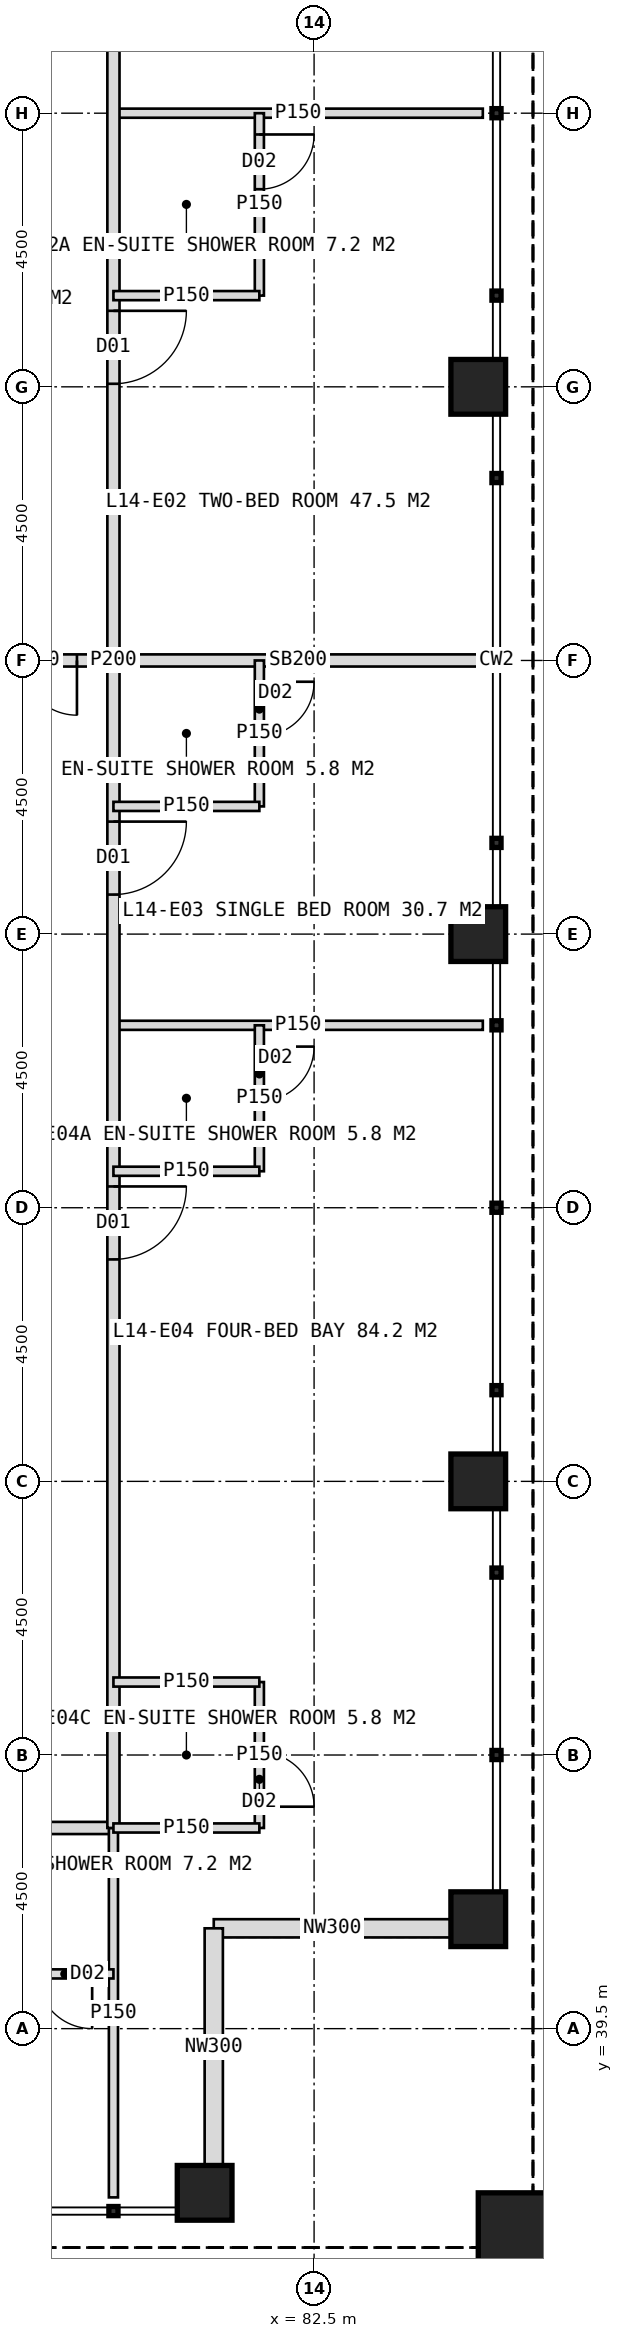
"""IFC4 building model, lengths in metres.
Left out: names, types, materials, properties, quantities, classifications, styles, units other than length and angle.
Written with IfcOpenShell. Run it as: python <this file> out.ifc"""

import sys

from ifc_helpers import new_model, si_unit, direction, frame, frame_2d, origin, origin_2d, place, context, subcontext, project, spatial, rectangle, hollow_rectangle, extrude, element, fill, save


model = new_model("IFC4")
c1 = context("Model", 3, precision=1e-05, world=origin(), true_north=direction((0.0, 1.0)))
c2 = subcontext(c1, "Body", "Model", "MODEL_VIEW")
j1 = project(units=[si_unit("LENGTHUNIT", "METRE"), si_unit("PLANEANGLEUNIT", "RADIAN")], contexts=[c1])
p1 = place(None, origin())
s1 = spatial("IfcSite", under=j1, at=p1, CompositionType="ELEMENT")
p2 = place(p1, origin())
s2 = spatial("IfcBuilding", under=s1, at=p2, CompositionType="ELEMENT")
p3 = place(p2, frame((0.0, 0.0, 63.0)))
s3 = spatial("IfcBuildingStorey", under=s2, at=p3, CompositionType="ELEMENT", Elevation=63.0)
for number, where, z_axis, x_axis in (
    (1, (85.2, 41.3, 0.0), (0.0, 0.0, 1.0), (1.0, 0.0, 0.0)),
    (2, (85.2, 48.5, 0.0), (0.0, 0.0, 1.0), (1.0, 0.0, 0.0)),
    (3, (85.2, 57.5, 0.0), (0.0, 0.0, 1.0), (1.0, 0.0, 0.0)),
    (4, (85.2, 66.5, 0.0), (0.0, 0.0, 1.0), (1.0, 0.0, 0.0)),
    (5, (80.7, 36.8, 0.0), (0.0, 0.0, 1.0), (1.0, 0.0, 0.0)),
):
    element("IfcColumn", number, at=place(p3, frame(where, z_axis=z_axis, x_axis=x_axis)), inside=s3, PredefinedType="COLUMN", context=c2, shape_type="SweptSolid", body=[
        extrude(hollow_rectangle(XDim=0.9, YDim=0.9, WallThickness=0.08, at=origin_2d()), origin(), (0.0, 0.0, 1.0), 4.0),
    ])
p4 = place(p3, frame((86.1, 35.9, 0.0), z_axis=(0.0, 0.0, 1.0), x_axis=(1.0, 0.0, 0.0)))
e6 = element("IfcColumn", 6, at=p4, inside=s3, PredefinedType="COLUMN", context=c2, shape_type="SweptSolid", body=[
    extrude(hollow_rectangle(XDim=1.8, YDim=1.8, WallThickness=0.1, at=origin_2d()), origin(), (0.0, 0.0, 1.0), 4.0),
])
for number, where, z_axis, x_axis in (
    (7, (84.75, 41.15, 0.0), (0.0, 0.0, 1.0), (-1.0, 0.0, 0.0)),
    (8, (80.85, 41.15, 0.0), (0.0, 0.0, 1.0), (0.0, -1.0, 0.0)),
):
    element("IfcWall", number, at=place(p3, frame(where, z_axis=z_axis, x_axis=x_axis)), inside=s3, PredefinedType="ELEMENTEDWALL", context=c2, shape_type="SweptSolid", body=[
        extrude(rectangle(XDim=3.9, YDim=0.3, at=frame_2d((1.95, 0.0))), origin(), (0.0, 0.0, 1.0), 2.95),
    ])
p5 = place(p3, frame((79.2, 42.8, 0.0), z_axis=(0.0, 0.0, 1.0), x_axis=(-1.0, 0.0, 0.0)))
e9 = element("IfcWall", 9, at=p5, inside=s3, PredefinedType="PARTITIONING", context=c2, shape_type="SweptSolid", body=[
    extrude(rectangle(XDim=38.4, YDim=0.2, at=frame_2d((19.2, 0.0))), origin(), (0.0, 0.0, 1.0), 3.75),
])
p6 = place(p5, frame((3.25, 0.0, 0.0)))
e10 = element("IfcOpeningElement", 10, at=p6, cuts=e9, PredefinedType="OPENING", context=c2, shape_type="SweptSolid", body=[
    extrude(rectangle(XDim=1.2, YDim=2.2, at=frame_2d((0.6, 1.1))), frame((0.0, 0.11, 0.0), z_axis=(0.0, -1.0, 0.0), x_axis=(1.0, 0.0, 0.0)), (0.0, 0.0, 1.0), 0.22),
])
p7 = place(p5, frame((13.45, 0.0, 0.0)))
e11 = element("IfcOpeningElement", 11, at=p7, cuts=e9, PredefinedType="OPENING", context=c2, shape_type="SweptSolid", body=[
    extrude(rectangle(XDim=1.2, YDim=2.2, at=frame_2d((0.6, 1.1))), frame((0.0, 0.11, 0.0), z_axis=(0.0, -1.0, 0.0), x_axis=(1.0, 0.0, 0.0)), (0.0, 0.0, 1.0), 0.22),
])
p8 = place(p5, frame((22.45, 0.0, 0.0)))
e12 = element("IfcOpeningElement", 12, at=p8, cuts=e9, PredefinedType="OPENING", context=c2, shape_type="SweptSolid", body=[
    extrude(rectangle(XDim=1.2, YDim=2.2, at=frame_2d((0.6, 1.1))), frame((0.0, 0.11, 0.0), z_axis=(0.0, -1.0, 0.0), x_axis=(1.0, 0.0, 0.0)), (0.0, 0.0, 1.0), 0.22),
])
p9 = place(p5, frame((30.85, 0.0, 0.0)))
e13 = element("IfcOpeningElement", 13, at=p9, cuts=e9, PredefinedType="OPENING", context=c2, shape_type="SweptSolid", body=[
    extrude(rectangle(XDim=1.2, YDim=2.2, at=frame_2d((0.6, 1.1))), frame((0.0, 0.11, 0.0), z_axis=(0.0, -1.0, 0.0), x_axis=(1.0, 0.0, 0.0)), (0.0, 0.0, 1.0), 0.22),
])
p10 = place(p3, frame((79.2, 42.8, 0.0), z_axis=(0.0, 0.0, 1.0), x_axis=(0.0, -1.0, 0.0)))
e14 = element("IfcWall", 14, at=p10, inside=s3, PredefinedType="PARTITIONING", context=c2, shape_type="SweptSolid", body=[
    extrude(rectangle(XDim=6.075, YDim=0.15, at=frame_2d((3.038, 0.0))), origin(), (0.0, 0.0, 1.0), 3.75),
])
p11 = place(p3, frame((79.2, 40.4, 0.0), z_axis=(0.0, 0.0, 1.0), x_axis=(-1.0, 0.0, 0.0)))
e15 = element("IfcWall", 15, at=p11, inside=s3, PredefinedType="PARTITIONING", context=c2, shape_type="SweptSolid", body=[
    extrude(rectangle(XDim=3.0, YDim=0.15, at=frame_2d((1.5, 0.0))), origin(), (0.0, 0.0, 1.0), 3.75),
])
p12 = place(p11, frame((0.35, 0.0, 0.0)))
e16 = element("IfcOpeningElement", 16, at=p12, cuts=e15, PredefinedType="OPENING", context=c2, shape_type="SweptSolid", body=[
    extrude(rectangle(XDim=0.9, YDim=2.1, at=frame_2d((0.45, 1.05))), frame((0.0, 0.085, 0.0), z_axis=(0.0, -1.0, 0.0), x_axis=(1.0, 0.0, 0.0)), (0.0, 0.0, 1.0), 0.17),
])
p13 = place(p3, frame((79.2, 71.0, 0.0), z_axis=(0.0, 0.0, 1.0), x_axis=(1.0, 0.0, 0.0)))
e17 = element("IfcWall", 17, at=p13, inside=s3, PredefinedType="PARTITIONING", context=c2, shape_type="SweptSolid", body=[
    extrude(rectangle(XDim=6.075, YDim=0.15, at=frame_2d((3.038, 0.0))), origin(), (0.0, 0.0, 1.0), 3.75),
])
p14 = place(p3, frame((79.2, 62.0, 0.0), z_axis=(0.0, 0.0, 1.0), x_axis=(1.0, 0.0, 0.0)))
e18 = element("IfcWall", 18, at=p14, inside=s3, PredefinedType="SOLIDWALL", context=c2, shape_type="SweptSolid", body=[
    extrude(rectangle(XDim=6.075, YDim=0.2, at=frame_2d((3.038, 0.0))), origin(), (0.0, 0.0, 1.0), 2.75),
])
p15 = place(p3, frame((79.2, 56.0, 0.0), z_axis=(0.0, 0.0, 1.0), x_axis=(1.0, 0.0, 0.0)))
e19 = element("IfcWall", 19, at=p15, inside=s3, PredefinedType="PARTITIONING", context=c2, shape_type="SweptSolid", body=[
    extrude(rectangle(XDim=6.075, YDim=0.15, at=frame_2d((3.038, 0.0))), origin(), (0.0, 0.0, 1.0), 3.75),
])
p16 = place(p3, frame((79.2, 81.2, 0.0), z_axis=(0.0, 0.0, 1.0), x_axis=(0.0, -1.0, 0.0)))
e20 = element("IfcWall", 20, at=p16, inside=s3, PredefinedType="PARTITIONING", context=c2, shape_type="SweptSolid", body=[
    extrude(rectangle(XDim=38.4, YDim=0.2, at=frame_2d((19.2, 0.0))), origin(), (0.0, 0.0, 1.0), 3.75),
])
p17 = place(p16, frame((3.25, 0.0, 0.0)))
e21 = element("IfcOpeningElement", 21, at=p17, cuts=e20, PredefinedType="OPENING", context=c2, shape_type="SweptSolid", body=[
    extrude(rectangle(XDim=1.2, YDim=2.2, at=frame_2d((0.6, 1.1))), frame((0.0, 0.11, 0.0), z_axis=(0.0, -1.0, 0.0), x_axis=(1.0, 0.0, 0.0)), (0.0, 0.0, 1.0), 0.22),
])
p18 = place(p16, frame((13.45, 0.0, 0.0)))
e22 = element("IfcOpeningElement", 22, at=p18, cuts=e20, PredefinedType="OPENING", context=c2, shape_type="SweptSolid", body=[
    extrude(rectangle(XDim=1.2, YDim=2.2, at=frame_2d((0.6, 1.1))), frame((0.0, 0.11, 0.0), z_axis=(0.0, -1.0, 0.0), x_axis=(1.0, 0.0, 0.0)), (0.0, 0.0, 1.0), 0.22),
])
p19 = place(p16, frame((21.85, 0.0, 0.0)))
e23 = element("IfcOpeningElement", 23, at=p19, cuts=e20, PredefinedType="OPENING", context=c2, shape_type="SweptSolid", body=[
    extrude(rectangle(XDim=1.2, YDim=2.2, at=frame_2d((0.6, 1.1))), frame((0.0, 0.11, 0.0), z_axis=(0.0, -1.0, 0.0), x_axis=(1.0, 0.0, 0.0)), (0.0, 0.0, 1.0), 0.22),
])
p20 = place(p16, frame((27.85, 0.0, 0.0)))
e24 = element("IfcOpeningElement", 24, at=p20, cuts=e20, PredefinedType="OPENING", context=c2, shape_type="SweptSolid", body=[
    extrude(rectangle(XDim=1.2, YDim=2.2, at=frame_2d((0.6, 1.1))), frame((0.0, 0.11, 0.0), z_axis=(0.0, -1.0, 0.0), x_axis=(1.0, 0.0, 0.0)), (0.0, 0.0, 1.0), 0.22),
])
p21 = place(p3, frame((81.6, 71.0, 0.0), z_axis=(0.0, 0.0, 1.0), x_axis=(0.0, -1.0, 0.0)))
e25 = element("IfcWall", 25, at=p21, inside=s3, PredefinedType="PARTITIONING", context=c2, shape_type="SweptSolid", body=[
    extrude(rectangle(XDim=3.0, YDim=0.15, at=frame_2d((1.5, 0.0))), origin(), (0.0, 0.0, 1.0), 3.75),
])
p22 = place(p21, frame((0.35, 0.0, 0.0)))
e26 = element("IfcOpeningElement", 26, at=p22, cuts=e25, PredefinedType="OPENING", context=c2, shape_type="SweptSolid", body=[
    extrude(rectangle(XDim=0.9, YDim=2.1, at=frame_2d((0.45, 1.05))), frame((0.0, 0.085, 0.0), z_axis=(0.0, -1.0, 0.0), x_axis=(1.0, 0.0, 0.0)), (0.0, 0.0, 1.0), 0.17),
])
p23 = place(p3, frame((79.2, 68.0, 0.0), z_axis=(0.0, 0.0, 1.0), x_axis=(1.0, 0.0, 0.0)))
e27 = element("IfcWall", 27, at=p23, inside=s3, PredefinedType="PARTITIONING", context=c2, shape_type="SweptSolid", body=[
    extrude(rectangle(XDim=2.4, YDim=0.15, at=frame_2d((1.2, 0.0))), origin(), (0.0, 0.0, 1.0), 3.75),
])
p24 = place(p3, frame((81.6, 62.0, 0.0), z_axis=(0.0, 0.0, 1.0), x_axis=(0.0, -1.0, 0.0)))
e28 = element("IfcWall", 28, at=p24, inside=s3, PredefinedType="PARTITIONING", context=c2, shape_type="SweptSolid", body=[
    extrude(rectangle(XDim=2.4, YDim=0.15, at=frame_2d((1.2, 0.0))), origin(), (0.0, 0.0, 1.0), 3.75),
])
p25 = place(p24, frame((0.35, 0.0, 0.0)))
e29 = element("IfcOpeningElement", 29, at=p25, cuts=e28, PredefinedType="OPENING", context=c2, shape_type="SweptSolid", body=[
    extrude(rectangle(XDim=0.9, YDim=2.1, at=frame_2d((0.45, 1.05))), frame((0.0, 0.085, 0.0), z_axis=(0.0, -1.0, 0.0), x_axis=(1.0, 0.0, 0.0)), (0.0, 0.0, 1.0), 0.17),
])
p26 = place(p3, frame((79.2, 59.6, 0.0), z_axis=(0.0, 0.0, 1.0), x_axis=(1.0, 0.0, 0.0)))
e30 = element("IfcWall", 30, at=p26, inside=s3, PredefinedType="PARTITIONING", context=c2, shape_type="SweptSolid", body=[
    extrude(rectangle(XDim=2.4, YDim=0.15, at=frame_2d((1.2, 0.0))), origin(), (0.0, 0.0, 1.0), 3.75),
])
p27 = place(p3, frame((81.6, 56.0, 0.0), z_axis=(0.0, 0.0, 1.0), x_axis=(0.0, -1.0, 0.0)))
e31 = element("IfcWall", 31, at=p27, inside=s3, PredefinedType="PARTITIONING", context=c2, shape_type="SweptSolid", body=[
    extrude(rectangle(XDim=2.4, YDim=0.15, at=frame_2d((1.2, 0.0))), origin(), (0.0, 0.0, 1.0), 3.75),
])
p28 = place(p27, frame((0.35, 0.0, 0.0)))
e32 = element("IfcOpeningElement", 32, at=p28, cuts=e31, PredefinedType="OPENING", context=c2, shape_type="SweptSolid", body=[
    extrude(rectangle(XDim=0.9, YDim=2.1, at=frame_2d((0.45, 1.05))), frame((0.0, 0.085, 0.0), z_axis=(0.0, -1.0, 0.0), x_axis=(1.0, 0.0, 0.0)), (0.0, 0.0, 1.0), 0.17),
])
p29 = place(p3, frame((79.2, 53.6, 0.0), z_axis=(0.0, 0.0, 1.0), x_axis=(1.0, 0.0, 0.0)))
e33 = element("IfcWall", 33, at=p29, inside=s3, PredefinedType="PARTITIONING", context=c2, shape_type="SweptSolid", body=[
    extrude(rectangle(XDim=2.4, YDim=0.15, at=frame_2d((1.2, 0.0))), origin(), (0.0, 0.0, 1.0), 3.75),
])
p30 = place(p3, frame((81.6, 45.2, 0.0), z_axis=(0.0, 0.0, 1.0), x_axis=(0.0, -1.0, 0.0)))
e34 = element("IfcWall", 34, at=p30, inside=s3, PredefinedType="PARTITIONING", context=c2, shape_type="SweptSolid", body=[
    extrude(rectangle(XDim=2.4, YDim=0.15, at=frame_2d((1.2, 0.0))), origin(), (0.0, 0.0, 1.0), 3.75),
])
p31 = place(p30, frame((1.15, 0.0, 0.0)))
e35 = element("IfcOpeningElement", 35, at=p31, cuts=e34, PredefinedType="OPENING", context=c2, shape_type="SweptSolid", body=[
    extrude(rectangle(XDim=0.9, YDim=2.1, at=frame_2d((0.45, 1.05))), frame((0.0, 0.085, 0.0), z_axis=(0.0, -1.0, 0.0), x_axis=(1.0, 0.0, 0.0)), (0.0, 0.0, 1.0), 0.17),
])
for number, where, z_axis, x_axis in (
    (36, (79.2, 45.2, 0.0), (0.0, 0.0, 1.0), (1.0, 0.0, 0.0)),
    (37, (79.2, 42.8, 0.0), (0.0, 0.0, 1.0), (1.0, 0.0, 0.0)),
):
    element("IfcWall", number, at=place(p3, frame(where, z_axis=z_axis, x_axis=x_axis)), inside=s3, PredefinedType="PARTITIONING", context=c2, shape_type="SweptSolid", body=[
        extrude(rectangle(XDim=2.4, YDim=0.15, at=frame_2d((1.2, 0.0))), origin(), (0.0, 0.0, 1.0), 3.75),
    ])
p32 = place(p3, frame((76.5, 62.0, 0.0), z_axis=(0.0, 0.0, 1.0), x_axis=(1.0, 0.0, 0.0)))
e38 = element("IfcWall", 38, at=p32, inside=s3, PredefinedType="SOLIDWALL", context=c2, shape_type="SweptSolid", body=[
    extrude(rectangle(XDim=2.7, YDim=0.2, at=frame_2d((1.35, 0.0))), origin(), (0.0, 0.0, 1.0), 2.75),
])
p33 = place(p32, frame((0.3, 0.0, 0.0)))
e39 = element("IfcOpeningElement", 39, at=p33, cuts=e38, PredefinedType="OPENING", context=c2, shape_type="SweptSolid", body=[
    extrude(rectangle(XDim=1.8, YDim=2.2, at=frame_2d((0.9, 1.1))), frame((0.0, 0.11, 0.0), z_axis=(0.0, -1.0, 0.0), x_axis=(1.0, 0.0, 0.0)), (0.0, 0.0, 1.0), 0.22),
])
p34 = place(p12, origin())
e40 = element("IfcDoor", 40, at=p34, inside=s3, OperationType="SINGLE_SWING_LEFT", PredefinedType="DOOR", context=c2, shape_type="SweptSolid", body=[
    extrude(rectangle(XDim=0.9, YDim=2.1, at=frame_2d((0.45, 1.05))), frame((0.0, 0.025, 0.0), z_axis=(0.0, -1.0, 0.0), x_axis=(1.0, 0.0, 0.0)), (0.0, 0.0, 1.0), 0.05),
])
fill(e16, e40)
p35 = place(p18, origin())
e41 = element("IfcDoor", 41, at=p35, inside=s3, OperationType="SINGLE_SWING_LEFT", PredefinedType="DOOR", context=c2, shape_type="SweptSolid", body=[
    extrude(rectangle(XDim=1.2, YDim=2.2, at=frame_2d((0.6, 1.1))), frame((0.0, 0.025, 0.0), z_axis=(0.0, -1.0, 0.0), x_axis=(1.0, 0.0, 0.0)), (0.0, 0.0, 1.0), 0.05),
])
fill(e22, e41)
p36 = place(p22, origin())
e42 = element("IfcDoor", 42, at=p36, inside=s3, OperationType="SINGLE_SWING_LEFT", PredefinedType="DOOR", context=c2, shape_type="SweptSolid", body=[
    extrude(rectangle(XDim=0.9, YDim=2.1, at=frame_2d((0.45, 1.05))), frame((0.0, 0.025, 0.0), z_axis=(0.0, -1.0, 0.0), x_axis=(1.0, 0.0, 0.0)), (0.0, 0.0, 1.0), 0.05),
])
fill(e26, e42)
p37 = place(p19, origin())
e43 = element("IfcDoor", 43, at=p37, inside=s3, OperationType="SINGLE_SWING_LEFT", PredefinedType="DOOR", context=c2, shape_type="SweptSolid", body=[
    extrude(rectangle(XDim=1.2, YDim=2.2, at=frame_2d((0.6, 1.1))), frame((0.0, 0.025, 0.0), z_axis=(0.0, -1.0, 0.0), x_axis=(1.0, 0.0, 0.0)), (0.0, 0.0, 1.0), 0.05),
])
fill(e23, e43)
p38 = place(p25, origin())
e44 = element("IfcDoor", 44, at=p38, inside=s3, OperationType="SINGLE_SWING_LEFT", PredefinedType="DOOR", context=c2, shape_type="SweptSolid", body=[
    extrude(rectangle(XDim=0.9, YDim=2.1, at=frame_2d((0.45, 1.05))), frame((0.0, 0.025, 0.0), z_axis=(0.0, -1.0, 0.0), x_axis=(1.0, 0.0, 0.0)), (0.0, 0.0, 1.0), 0.05),
])
fill(e29, e44)
p39 = place(p20, origin())
e45 = element("IfcDoor", 45, at=p39, inside=s3, OperationType="SINGLE_SWING_LEFT", PredefinedType="DOOR", context=c2, shape_type="SweptSolid", body=[
    extrude(rectangle(XDim=1.2, YDim=2.2, at=frame_2d((0.6, 1.1))), frame((0.0, 0.025, 0.0), z_axis=(0.0, -1.0, 0.0), x_axis=(1.0, 0.0, 0.0)), (0.0, 0.0, 1.0), 0.05),
])
fill(e24, e45)
p40 = place(p28, origin())
e46 = element("IfcDoor", 46, at=p40, inside=s3, OperationType="SINGLE_SWING_LEFT", PredefinedType="DOOR", context=c2, shape_type="SweptSolid", body=[
    extrude(rectangle(XDim=0.9, YDim=2.1, at=frame_2d((0.45, 1.05))), frame((0.0, 0.025, 0.0), z_axis=(0.0, -1.0, 0.0), x_axis=(1.0, 0.0, 0.0)), (0.0, 0.0, 1.0), 0.05),
])
fill(e32, e46)
p41 = place(p31, origin())
e47 = element("IfcDoor", 47, at=p41, inside=s3, OperationType="SINGLE_SWING_RIGHT", PredefinedType="DOOR", context=c2, shape_type="SweptSolid", body=[
    extrude(rectangle(XDim=0.9, YDim=2.1, at=frame_2d((0.45, 1.05))), frame((0.0, 0.025, 0.0), z_axis=(0.0, -1.0, 0.0), x_axis=(1.0, 0.0, 0.0)), (0.0, 0.0, 1.0), 0.05),
])
fill(e35, e47)
p42 = place(p33, origin())
e48 = element("IfcDoor", 48, at=p42, inside=s3, OperationType="DOUBLE_DOOR_DOUBLE_SWING", PredefinedType="DOOR", context=c2, shape_type="SweptSolid", body=[
    extrude(rectangle(XDim=1.8, YDim=2.2, at=frame_2d((0.9, 1.1))), frame((0.0, 0.025, 0.0), z_axis=(0.0, -1.0, 0.0), x_axis=(1.0, 0.0, 0.0)), (0.0, 0.0, 1.0), 0.05),
])
fill(e39, e48)
save(model, sys.argv[1])
